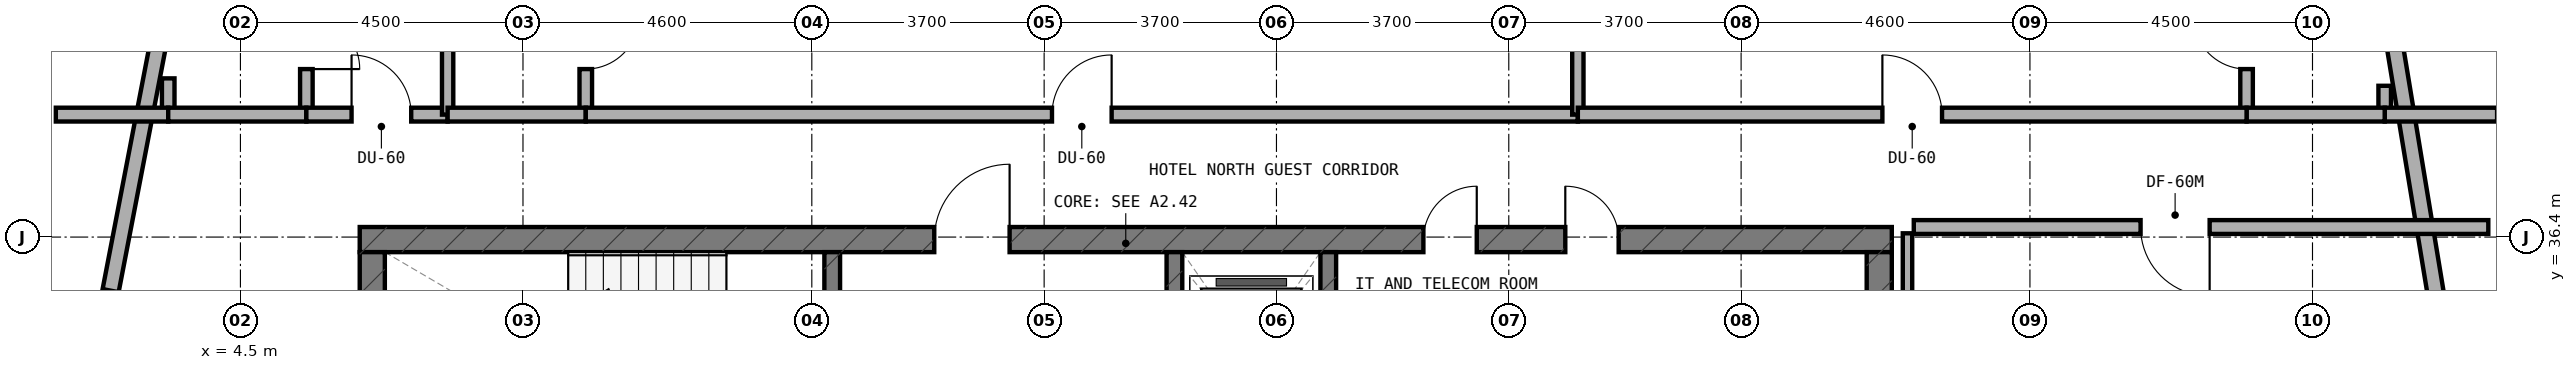
"""IFC4 building model, lengths in metres.
Left out: names, types, materials, properties, quantities, classifications, styles, units other than length and angle.
Written with IfcOpenShell. Run it as: python <this file> out.ifc"""

import sys

from ifc_helpers import new_model, si_unit, direction, frame, frame_2d, origin, place, context, subcontext, project, spatial, rectangle, extrude, element, fill, save


model = new_model("IFC4")
c1 = context("Model", 3, precision=1e-05, world=origin(), true_north=direction((0.0, 1.0)))
c2 = subcontext(c1, "Body", "Model", "MODEL_VIEW")
j1 = project(units=[si_unit("LENGTHUNIT", "METRE"), si_unit("PLANEANGLEUNIT", "RADIAN")], contexts=[c1])
p1 = place(None, origin())
s1 = spatial("IfcSite", under=j1, at=p1, CompositionType="ELEMENT")
p2 = place(p1, origin())
s2 = spatial("IfcBuilding", under=s1, at=p2, CompositionType="ELEMENT")
p3 = place(p2, frame((0.0, 0.0, 191.9)))
s3 = spatial("IfcBuildingStorey", under=s2, at=p3, CompositionType="ELEMENT", Elevation=191.9)
p4 = place(p3, frame((6.4, 36.36, 0.0), z_axis=(0.0, 0.0, 1.0), x_axis=(1.0, 0.0, 0.0)))
e1 = element("IfcWall", 1, at=p4, inside=s3, PredefinedType="SHEAR", context=c2, shape_type="SweptSolid", body=[
    extrude(rectangle(XDim=24.4, YDim=0.4, at=frame_2d((12.2, 0.0))), origin(), (0.0, 0.0, 1.0), 3.6),
])
p5 = place(p4, frame((9.15, 0.0, 0.0)))
e2 = element("IfcOpeningElement", 2, at=p5, cuts=e1, PredefinedType="OPENING", context=c2, shape_type="SweptSolid", body=[
    extrude(rectangle(XDim=1.2, YDim=2.15, at=frame_2d((0.6, 1.075))), frame((0.0, 0.21, 0.0), z_axis=(0.0, -1.0, 0.0), x_axis=(1.0, 0.0, 0.0)), (0.0, 0.0, 1.0), 0.42),
])
p6 = place(p4, frame((19.2, 0.0, 0.0)))
e3 = element("IfcOpeningElement", 3, at=p6, cuts=e1, PredefinedType="OPENING", context=c2, shape_type="SweptSolid", body=[
    extrude(rectangle(XDim=0.85, YDim=2.1, at=frame_2d((0.425, 1.05))), frame((0.0, 0.21, 0.0), z_axis=(0.0, -1.0, 0.0), x_axis=(1.0, 0.0, 0.0)), (0.0, 0.0, 1.0), 0.42),
])
p7 = place(p4, frame((16.94, 0.0, 0.0)))
e4 = element("IfcOpeningElement", 4, at=p7, cuts=e1, PredefinedType="OPENING", context=c2, shape_type="SweptSolid", body=[
    extrude(rectangle(XDim=0.85, YDim=2.1, at=frame_2d((0.425, 1.05))), frame((0.0, 0.21, 0.0), z_axis=(0.0, -1.0, 0.0), x_axis=(1.0, 0.0, 0.0)), (0.0, 0.0, 1.0), 0.42),
])
for number, where, z_axis, x_axis in (
    (5, (6.6, 33.0, 0.0), (0.0, 0.0, 1.0), (0.0, 1.0, 0.0)),
    (6, (30.6, 33.0, 0.0), (0.0, 0.0, 1.0), (0.0, 1.0, 0.0)),
):
    element("IfcWall", number, at=place(p3, frame(where, z_axis=z_axis, x_axis=x_axis)), inside=s3, PredefinedType="SHEAR", context=c2, shape_type="SweptSolid", body=[
        extrude(rectangle(XDim=3.16, YDim=0.4, at=frame_2d((1.58, 0.0))), origin(), (0.0, 0.0, 1.0), 3.6),
    ])
p8 = place(p3, frame((13.925, 33.0, 0.0), z_axis=(0.0, 0.0, 1.0), x_axis=(0.0, 1.0, 0.0)))
e7 = element("IfcWall", 7, at=p8, inside=s3, PredefinedType="STANDARD", context=c2, shape_type="SweptSolid", body=[
    extrude(rectangle(XDim=3.16, YDim=0.25, at=frame_2d((1.58, 0.0))), origin(), (0.0, 0.0, 1.0), 3.32),
])
p9 = place(p8, frame((0.98, 0.0, 0.0)))
e8 = element("IfcOpeningElement", 8, at=p9, cuts=e7, PredefinedType="OPENING", context=c2, shape_type="SweptSolid", body=[
    extrude(rectangle(XDim=1.1, YDim=2.15, at=frame_2d((0.55, 1.075))), frame((0.0, 0.135, 0.0), z_axis=(0.0, -1.0, 0.0), x_axis=(1.0, 0.0, 0.0)), (0.0, 0.0, 1.0), 0.27),
])
p10 = place(p3, frame((19.375, 33.0, 0.0), z_axis=(0.0, 0.0, 1.0), x_axis=(0.0, 1.0, 0.0)))
e9 = element("IfcWall", 9, at=p10, inside=s3, PredefinedType="STANDARD", context=c2, shape_type="SweptSolid", body=[
    extrude(rectangle(XDim=3.16, YDim=0.25, at=frame_2d((1.58, 0.0))), origin(), (0.0, 0.0, 1.0), 3.32),
])
p11 = place(p10, frame((0.98, 0.0, 0.0)))
e10 = element("IfcOpeningElement", 10, at=p11, cuts=e9, PredefinedType="OPENING", context=c2, shape_type="SweptSolid", body=[
    extrude(rectangle(XDim=1.1, YDim=2.15, at=frame_2d((0.55, 1.075))), frame((0.0, 0.135, 0.0), z_axis=(0.0, -1.0, 0.0), x_axis=(1.0, 0.0, 0.0)), (0.0, 0.0, 1.0), 0.27),
])
p12 = place(p3, frame((21.825, 33.0, 0.0), z_axis=(0.0, 0.0, 1.0), x_axis=(0.0, 1.0, 0.0)))
e11 = element("IfcWall", 11, at=p12, inside=s3, PredefinedType="STANDARD", context=c2, shape_type="SweptSolid", body=[
    extrude(rectangle(XDim=3.16, YDim=0.25, at=frame_2d((1.58, 0.0))), origin(), (0.0, 0.0, 1.0), 3.32),
])
p13 = place(p3, frame((40.476, 29.354, 0.0), z_axis=(0.0, 0.0, 1.0), x_axis=(-0.162811037825, 0.986657268742, 0.0)))
e12 = element("IfcWall", 12, at=p13, inside=s3, PredefinedType="STANDARD", context=c2, shape_type="SweptSolid", body=[
    extrude(rectangle(XDim=10.473, YDim=0.26, at=frame_2d((5.236, 0.0))), origin(), (0.0, 0.0, 1.0), 3.32),
])
p14 = place(p13, frame((2.545, 0.0, 0.85)))
e13 = element("IfcOpeningElement", 13, at=p14, cuts=e12, PredefinedType="OPENING", context=c2, shape_type="SweptSolid", body=[
    extrude(rectangle(XDim=2.1, YDim=1.5, at=frame_2d((1.05, 0.75))), frame((0.0, 0.14, 0.0), z_axis=(0.0, -1.0, 0.0), x_axis=(1.0, 0.0, 0.0)), (0.0, 0.0, 1.0), 0.28),
])
p15 = place(p3, frame((3.23, 39.683, 0.0), z_axis=(0.0, 0.0, 1.0), x_axis=(-0.189254809039, -0.98192801022, 0.0)))
e14 = element("IfcWall", 14, at=p15, inside=s3, PredefinedType="STANDARD", context=c2, shape_type="SweptSolid", body=[
    extrude(rectangle(XDim=9.046, YDim=0.26, at=frame_2d((4.523, 0.0))), origin(), (0.0, 0.0, 1.0), 3.32),
])
p16 = place(p15, frame((4.212, 0.0, 0.85)))
e15 = element("IfcOpeningElement", 15, at=p16, cuts=e14, PredefinedType="OPENING", context=c2, shape_type="SweptSolid", body=[
    extrude(rectangle(XDim=2.1, YDim=1.5, at=frame_2d((1.05, 0.75))), frame((0.0, 0.14, 0.0), z_axis=(0.0, -1.0, 0.0), x_axis=(1.0, 0.0, 0.0)), (0.0, 0.0, 1.0), 0.28),
])
p17 = place(p3, frame((5.55, 38.45, 0.0), z_axis=(0.0, 0.0, 1.0), x_axis=(0.0, 1.0, 0.0)))
e16 = element("IfcWall", 16, at=p17, inside=s3, PredefinedType="PLUMBINGWALL", context=c2, shape_type="SweptSolid", body=[
    extrude(rectangle(XDim=2.1, YDim=0.2, at=frame_2d((1.05, 0.0))), origin(), (0.0, 0.0, 1.0), 3.32),
])
p18 = place(p17, frame((0.625, 0.0, 0.0)))
e17 = element("IfcOpeningElement", 17, at=p18, cuts=e16, PredefinedType="OPENING", context=c2, shape_type="SweptSolid", body=[
    extrude(rectangle(XDim=0.85, YDim=2.1, at=frame_2d((0.425, 1.05))), frame((0.0, 0.11, 0.0), z_axis=(0.0, -1.0, 0.0), x_axis=(1.0, 0.0, 0.0)), (0.0, 0.0, 1.0), 0.22),
])
p19 = place(p3, frame((3.35, 38.35, 0.0), z_axis=(0.0, 0.0, 1.0), x_axis=(0.0, 1.0, 0.0)))
e18 = element("IfcWall", 18, at=p19, inside=s3, PredefinedType="PLUMBINGWALL", context=c2, shape_type="SweptSolid", body=[
    extrude(rectangle(XDim=0.577, YDim=0.2, at=frame_2d((0.289, 0.0))), origin(), (0.0, 0.0, 1.0), 3.32),
])
p20 = place(p3, frame((1.56, 38.35, 0.0), z_axis=(0.0, 0.0, 1.0), x_axis=(1.0, 0.0, 0.0)))
e19 = element("IfcWall", 19, at=p20, inside=s3, PredefinedType="SOLIDWALL", context=c2, shape_type="SweptSolid", body=[
    extrude(rectangle(XDim=1.79, YDim=0.22, at=frame_2d((0.895, 0.0))), origin(), (0.0, 0.0, 1.0), 3.32),
])
p21 = place(p3, frame((3.35, 38.35, 0.0), z_axis=(0.0, 0.0, 1.0), x_axis=(1.0, 0.0, 0.0)))
e20 = element("IfcWall", 20, at=p21, inside=s3, PredefinedType="SOLIDWALL", context=c2, shape_type="SweptSolid", body=[
    extrude(rectangle(XDim=2.2, YDim=0.22, at=frame_2d((1.1, 0.0))), origin(), (0.0, 0.0, 1.0), 3.32),
])
p22 = place(p3, frame((5.55, 38.35, 0.0), z_axis=(0.0, 0.0, 1.0), x_axis=(1.0, 0.0, 0.0)))
e21 = element("IfcWall", 21, at=p22, inside=s3, PredefinedType="SOLIDWALL", context=c2, shape_type="SweptSolid", body=[
    extrude(rectangle(XDim=2.25, YDim=0.22, at=frame_2d((1.125, 0.0))), origin(), (0.0, 0.0, 1.0), 2.995),
])
p23 = place(p22, frame((0.72, 0.0, 0.0)))
e22 = element("IfcOpeningElement", 22, at=p23, cuts=e21, PredefinedType="OPENING", context=c2, shape_type="SweptSolid", body=[
    extrude(rectangle(XDim=0.95, YDim=2.1, at=frame_2d((0.475, 1.05))), frame((0.0, 0.12, 0.0), z_axis=(0.0, -1.0, 0.0), x_axis=(1.0, 0.0, 0.0)), (0.0, 0.0, 1.0), 0.24),
])
p24 = place(p3, frame((7.8, 38.35, 0.0), z_axis=(0.0, 0.0, 1.0), x_axis=(0.0, 1.0, 0.0)))
e23 = element("IfcWall", 23, at=p24, inside=s3, PredefinedType="SOLIDWALL", context=c2, shape_type="SweptSolid", body=[
    extrude(rectangle(XDim=4.778, YDim=0.18, at=frame_2d((2.389, 0.0))), origin(), (0.0, 0.0, 1.0), 2.935),
])
p25 = place(p3, frame((10.0, 38.45, 0.0), z_axis=(0.0, 0.0, 1.0), x_axis=(0.0, 1.0, 0.0)))
e24 = element("IfcWall", 24, at=p25, inside=s3, PredefinedType="PLUMBINGWALL", context=c2, shape_type="SweptSolid", body=[
    extrude(rectangle(XDim=2.1, YDim=0.2, at=frame_2d((1.05, 0.0))), origin(), (0.0, 0.0, 1.0), 2.935),
])
p26 = place(p25, frame((0.625, 0.0, 0.0)))
e25 = element("IfcOpeningElement", 25, at=p26, cuts=e24, PredefinedType="OPENING", context=c2, shape_type="SweptSolid", body=[
    extrude(rectangle(XDim=0.85, YDim=2.1, at=frame_2d((0.425, 1.05))), frame((0.0, 0.11, 0.0), z_axis=(0.0, -1.0, 0.0), x_axis=(1.0, 0.0, 0.0)), (0.0, 0.0, 1.0), 0.22),
])
p27 = place(p3, frame((7.8, 38.35, 0.0), z_axis=(0.0, 0.0, 1.0), x_axis=(1.0, 0.0, 0.0)))
e26 = element("IfcWall", 26, at=p27, inside=s3, PredefinedType="SOLIDWALL", context=c2, shape_type="SweptSolid", body=[
    extrude(rectangle(XDim=2.2, YDim=0.22, at=frame_2d((1.1, 0.0))), origin(), (0.0, 0.0, 1.0), 2.995),
])
p28 = place(p3, frame((10.0, 38.35, 0.0), z_axis=(0.0, 0.0, 1.0), x_axis=(1.0, 0.0, 0.0)))
e27 = element("IfcWall", 27, at=p28, inside=s3, PredefinedType="SOLIDWALL", context=c2, shape_type="SweptSolid", body=[
    extrude(rectangle(XDim=15.8, YDim=0.22, at=frame_2d((7.9, 0.0))), origin(), (0.0, 0.0, 1.0), 2.995),
])
p29 = place(p28, frame((7.425, 0.0, 0.0)))
e28 = element("IfcOpeningElement", 28, at=p29, cuts=e27, PredefinedType="OPENING", context=c2, shape_type="SweptSolid", body=[
    extrude(rectangle(XDim=0.95, YDim=2.1, at=frame_2d((0.475, 1.05))), frame((0.0, 0.12, 0.0), z_axis=(0.0, -1.0, 0.0), x_axis=(1.0, 0.0, 0.0)), (0.0, 0.0, 1.0), 0.24),
])
p30 = place(p3, frame((25.8, 38.35, 0.0), z_axis=(0.0, 0.0, 1.0), x_axis=(0.0, 1.0, 0.0)))
e29 = element("IfcWall", 29, at=p30, inside=s3, PredefinedType="SOLIDWALL", context=c2, shape_type="SweptSolid", body=[
    extrude(rectangle(XDim=6.19, YDim=0.18, at=frame_2d((3.095, 0.0))), origin(), (0.0, 0.0, 1.0), 2.935),
])
p31 = place(p3, frame((36.45, 38.45, 0.0), z_axis=(0.0, 0.0, 1.0), x_axis=(0.0, 1.0, 0.0)))
e30 = element("IfcWall", 30, at=p31, inside=s3, PredefinedType="PLUMBINGWALL", context=c2, shape_type="SweptSolid", body=[
    extrude(rectangle(XDim=2.1, YDim=0.2, at=frame_2d((1.05, 0.0))), origin(), (0.0, 0.0, 1.0), 3.32),
])
p32 = place(p31, frame((0.625, 0.0, 0.0)))
e31 = element("IfcOpeningElement", 31, at=p32, cuts=e30, PredefinedType="OPENING", context=c2, shape_type="SweptSolid", body=[
    extrude(rectangle(XDim=0.85, YDim=2.1, at=frame_2d((0.425, 1.05))), frame((0.0, 0.11, 0.0), z_axis=(0.0, -1.0, 0.0), x_axis=(1.0, 0.0, 0.0)), (0.0, 0.0, 1.0), 0.22),
])
p33 = place(p3, frame((38.65, 38.35, 0.0), z_axis=(0.0, 0.0, 1.0), x_axis=(0.0, 1.0, 0.0)))
e32 = element("IfcWall", 32, at=p33, inside=s3, PredefinedType="PLUMBINGWALL", context=c2, shape_type="SweptSolid", body=[
    extrude(rectangle(XDim=0.459, YDim=0.2, at=frame_2d((0.229, 0.0))), origin(), (0.0, 0.0, 1.0), 3.32),
])
p34 = place(p3, frame((38.65, 38.35, 0.0), z_axis=(0.0, 0.0, 1.0), x_axis=(1.0, 0.0, 0.0)))
e33 = element("IfcWall", 33, at=p34, inside=s3, PredefinedType="SOLIDWALL", context=c2, shape_type="SweptSolid", body=[
    extrude(rectangle(XDim=1.79, YDim=0.22, at=frame_2d((0.895, 0.0))), origin(), (0.0, 0.0, 1.0), 3.32),
])
p35 = place(p3, frame((36.45, 38.35, 0.0), z_axis=(0.0, 0.0, 1.0), x_axis=(1.0, 0.0, 0.0)))
e34 = element("IfcWall", 34, at=p35, inside=s3, PredefinedType="SOLIDWALL", context=c2, shape_type="SweptSolid", body=[
    extrude(rectangle(XDim=2.2, YDim=0.22, at=frame_2d((1.1, 0.0))), origin(), (0.0, 0.0, 1.0), 3.32),
])
p36 = place(p3, frame((25.8, 38.35, 0.0), z_axis=(0.0, 0.0, 1.0), x_axis=(1.0, 0.0, 0.0)))
e35 = element("IfcWall", 35, at=p36, inside=s3, PredefinedType="SOLIDWALL", context=c2, shape_type="SweptSolid", body=[
    extrude(rectangle(XDim=10.65, YDim=0.22, at=frame_2d((5.325, 0.0))), origin(), (0.0, 0.0, 1.0), 2.935),
])
p37 = place(p36, frame((4.85, 0.0, 0.0)))
e36 = element("IfcOpeningElement", 36, at=p37, cuts=e35, PredefinedType="OPENING", context=c2, shape_type="SweptSolid", body=[
    extrude(rectangle(XDim=0.95, YDim=2.1, at=frame_2d((0.475, 1.05))), frame((0.0, 0.12, 0.0), z_axis=(0.0, -1.0, 0.0), x_axis=(1.0, 0.0, 0.0)), (0.0, 0.0, 1.0), 0.24),
])
p38 = place(p3, frame((31.05, 29.8, 0.0), z_axis=(0.0, 0.0, 1.0), x_axis=(0.0, 1.0, 0.0)))
e37 = element("IfcWall", 37, at=p38, inside=s3, PredefinedType="PARTITIONING", context=c2, shape_type="SweptSolid", body=[
    extrude(rectangle(XDim=6.66, YDim=0.15, at=frame_2d((3.33, 0.0))), origin(), (0.0, 0.0, 1.0), 2.995),
])
p39 = place(p3, frame((31.15, 36.56, 0.0), z_axis=(0.0, 0.0, 1.0), x_axis=(1.0, 0.0, 0.0)))
e38 = element("IfcWall", 38, at=p39, inside=s3, PredefinedType="SOLIDWALL", context=c2, shape_type="SweptSolid", body=[
    extrude(rectangle(XDim=9.15, YDim=0.22, at=frame_2d((4.575, 0.0))), origin(), (0.0, 0.0, 1.0), 2.935),
])
p40 = place(p39, frame((3.612, 0.0, 0.0)))
e39 = element("IfcOpeningElement", 39, at=p40, cuts=e38, PredefinedType="OPENING", context=c2, shape_type="SweptSolid", body=[
    extrude(rectangle(XDim=1.1, YDim=2.1, at=frame_2d((0.55, 1.05))), frame((0.0, 0.12, 0.0), z_axis=(0.0, -1.0, 0.0), x_axis=(1.0, 0.0, 0.0)), (0.0, 0.0, 1.0), 0.24),
])
p41 = place(p5, origin())
e40 = element("IfcDoor", 40, at=p41, inside=s3, OperationType="SINGLE_SWING_RIGHT", PredefinedType="DOOR", context=c2, shape_type="SweptSolid", body=[
    extrude(rectangle(XDim=1.2, YDim=2.15, at=frame_2d((0.6, 1.075))), frame((0.0, 0.025, 0.0), z_axis=(0.0, -1.0, 0.0), x_axis=(1.0, 0.0, 0.0)), (0.0, 0.0, 1.0), 0.05),
])
fill(e2, e40)
p42 = place(p6, origin())
e41 = element("IfcDoor", 41, at=p42, inside=s3, OperationType="SINGLE_SWING_LEFT", PredefinedType="DOOR", context=c2, shape_type="SweptSolid", body=[
    extrude(rectangle(XDim=0.85, YDim=2.1, at=frame_2d((0.425, 1.05))), frame((0.0, 0.025, 0.0), z_axis=(0.0, -1.0, 0.0), x_axis=(1.0, 0.0, 0.0)), (0.0, 0.0, 1.0), 0.05),
])
fill(e3, e41)
p43 = place(p7, origin())
e42 = element("IfcDoor", 42, at=p43, inside=s3, OperationType="SINGLE_SWING_RIGHT", PredefinedType="DOOR", context=c2, shape_type="SweptSolid", body=[
    extrude(rectangle(XDim=0.85, YDim=2.1, at=frame_2d((0.425, 1.05))), frame((0.0, 0.025, 0.0), z_axis=(0.0, -1.0, 0.0), x_axis=(1.0, 0.0, 0.0)), (0.0, 0.0, 1.0), 0.05),
])
fill(e4, e42)
p44 = place(p18, frame((0.85, 0.0, 0.0), z_axis=(0.0, 0.0, 1.0), x_axis=(-1.0, 0.0, 0.0)))
e43 = element("IfcDoor", 43, at=p44, inside=s3, OperationType="SINGLE_SWING_RIGHT", PredefinedType="DOOR", context=c2, shape_type="SweptSolid", body=[
    extrude(rectangle(XDim=0.85, YDim=2.1, at=frame_2d((0.425, 1.05))), frame((0.0, 0.025, 0.0), z_axis=(0.0, -1.0, 0.0), x_axis=(1.0, 0.0, 0.0)), (0.0, 0.0, 1.0), 0.05),
])
fill(e17, e43)
p45 = place(p23, origin())
e44 = element("IfcDoor", 44, at=p45, inside=s3, OperationType="SINGLE_SWING_LEFT", PredefinedType="DOOR", context=c2, shape_type="SweptSolid", body=[
    extrude(rectangle(XDim=0.95, YDim=2.1, at=frame_2d((0.475, 1.05))), frame((0.0, 0.025, 0.0), z_axis=(0.0, -1.0, 0.0), x_axis=(1.0, 0.0, 0.0)), (0.0, 0.0, 1.0), 0.05),
])
fill(e22, e44)
p46 = place(p26, frame((0.85, 0.0, 0.0), z_axis=(0.0, 0.0, 1.0), x_axis=(-1.0, 0.0, 0.0)))
e45 = element("IfcDoor", 45, at=p46, inside=s3, OperationType="SINGLE_SWING_LEFT", PredefinedType="DOOR", context=c2, shape_type="SweptSolid", body=[
    extrude(rectangle(XDim=0.85, YDim=2.1, at=frame_2d((0.425, 1.05))), frame((0.0, 0.025, 0.0), z_axis=(0.0, -1.0, 0.0), x_axis=(1.0, 0.0, 0.0)), (0.0, 0.0, 1.0), 0.05),
])
fill(e25, e45)
p47 = place(p29, origin())
e46 = element("IfcDoor", 46, at=p47, inside=s3, OperationType="SINGLE_SWING_RIGHT", PredefinedType="DOOR", context=c2, shape_type="SweptSolid", body=[
    extrude(rectangle(XDim=0.95, YDim=2.1, at=frame_2d((0.475, 1.05))), frame((0.0, 0.025, 0.0), z_axis=(0.0, -1.0, 0.0), x_axis=(1.0, 0.0, 0.0)), (0.0, 0.0, 1.0), 0.05),
])
fill(e28, e46)
p48 = place(p32, origin())
e47 = element("IfcDoor", 47, at=p48, inside=s3, OperationType="SINGLE_SWING_RIGHT", PredefinedType="DOOR", context=c2, shape_type="SweptSolid", body=[
    extrude(rectangle(XDim=0.85, YDim=2.1, at=frame_2d((0.425, 1.05))), frame((0.0, 0.025, 0.0), z_axis=(0.0, -1.0, 0.0), x_axis=(1.0, 0.0, 0.0)), (0.0, 0.0, 1.0), 0.05),
])
fill(e31, e47)
p49 = place(p37, origin())
e48 = element("IfcDoor", 48, at=p49, inside=s3, OperationType="SINGLE_SWING_LEFT", PredefinedType="DOOR", context=c2, shape_type="SweptSolid", body=[
    extrude(rectangle(XDim=0.95, YDim=2.1, at=frame_2d((0.475, 1.05))), frame((0.0, 0.025, 0.0), z_axis=(0.0, -1.0, 0.0), x_axis=(1.0, 0.0, 0.0)), (0.0, 0.0, 1.0), 0.05),
])
fill(e36, e48)
p50 = place(p40, frame((1.1, 0.0, 0.0), z_axis=(0.0, 0.0, 1.0), x_axis=(-1.0, 0.0, 0.0)))
e49 = element("IfcDoor", 49, at=p50, inside=s3, OperationType="SINGLE_SWING_LEFT", PredefinedType="DOOR", context=c2, shape_type="SweptSolid", body=[
    extrude(rectangle(XDim=1.1, YDim=2.1, at=frame_2d((0.55, 1.05))), frame((0.0, 0.025, 0.0), z_axis=(0.0, -1.0, 0.0), x_axis=(1.0, 0.0, 0.0)), (0.0, 0.0, 1.0), 0.05),
])
fill(e39, e49)
save(model, sys.argv[1])
